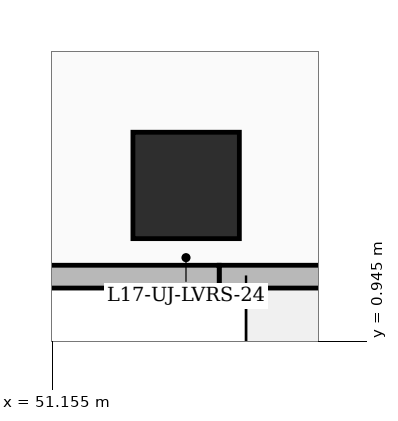
"""IFC4 building model, lengths in metres.
Left out: names, types, materials, properties, quantities, classifications, styles, units other than length and angle.
Written with IfcOpenShell. Run it as: python <this file> out.ifc"""

import sys

from ifc_helpers import new_model, si_unit, direction, frame, frame_2d, origin, origin_2d, place, context, subcontext, project, spatial, rectangle, extrude, element, save


model = new_model("IFC4")
c1 = context("Model", 3, precision=1e-05, world=origin(), true_north=direction((0.0, 1.0)))
c2 = subcontext(c1, "Body", "Model", "MODEL_VIEW")
j1 = project(units=[si_unit("LENGTHUNIT", "METRE"), si_unit("PLANEANGLEUNIT", "RADIAN")], contexts=[c1])
p1 = place(None, origin())
s1 = spatial("IfcSite", under=j1, at=p1, CompositionType="ELEMENT")
p2 = place(p1, origin())
s2 = spatial("IfcBuilding", under=s1, at=p2, CompositionType="ELEMENT")
p3 = place(p2, frame((0.0, 0.0, 71.4)))
s3 = spatial("IfcBuildingStorey", under=s2, at=p3, CompositionType="ELEMENT", Elevation=71.4)
p4 = place(p3, frame((52.912, 3.0, 0.0), z_axis=(0.0, 0.0, 1.0), x_axis=(1.0, 0.0, 0.0)))
e1 = element("IfcColumn", 1, at=p4, inside=s3, PredefinedType="COLUMN", context=c2, shape_type="SweptSolid", body=[
    extrude(rectangle(XDim=1.4, YDim=1.4, at=origin_2d()), origin(), (0.0, 0.0, 1.0), 3.6),
])
p5 = place(p3, frame((60.535, 1.8, 0.0), z_axis=(0.0, 0.0, 1.0), x_axis=(-1.0, 0.0, 0.0)))
e2 = element("IfcWall", 2, at=p5, inside=s3, PredefinedType="SOLIDWALL", context=c2, shape_type="SweptSolid", body=[
    extrude(rectangle(XDim=7.188, YDim=0.3, at=frame_2d((3.594, 0.0))), origin(), (0.0, 0.0, 1.0), 3.35),
])
p6 = place(p5, frame((3.699, 0.0, 0.0)))
e3 = element("IfcOpeningElement", 3, at=p6, cuts=e2, PredefinedType="OPENING", context=c2, shape_type="SweptSolid", body=[
    extrude(rectangle(XDim=1.0, YDim=2.2, at=frame_2d((0.5, 1.1))), frame((0.0, 0.16, 0.0), z_axis=(0.0, -1.0, 0.0), x_axis=(1.0, 0.0, 0.0)), (0.0, 0.0, 1.0), 0.32),
])
p7 = place(p3, frame((53.347, 1.8, 0.0), z_axis=(0.0, 0.0, 1.0), x_axis=(-1.0, 0.0, 0.0)))
e4 = element("IfcWall", 4, at=p7, inside=s3, PredefinedType="SOLIDWALL", context=c2, shape_type="SweptSolid", body=[
    extrude(rectangle(XDim=7.793, YDim=0.3, at=frame_2d((3.897, 0.0))), origin(), (0.0, 0.0, 1.0), 3.35),
])
p8 = place(p7, frame((3.85, 0.0, 0.55)))
e5 = element("IfcOpeningElement", 5, at=p8, cuts=e4, PredefinedType="OPENING", context=c2, shape_type="SweptSolid", body=[
    extrude(rectangle(XDim=1.6, YDim=2.2, at=frame_2d((0.8, 1.1))), frame((0.0, 0.16, 0.0), z_axis=(0.0, -1.0, 0.0), x_axis=(1.0, 0.0, 0.0)), (0.0, 0.0, 1.0), 0.32),
])
save(model, sys.argv[1])
